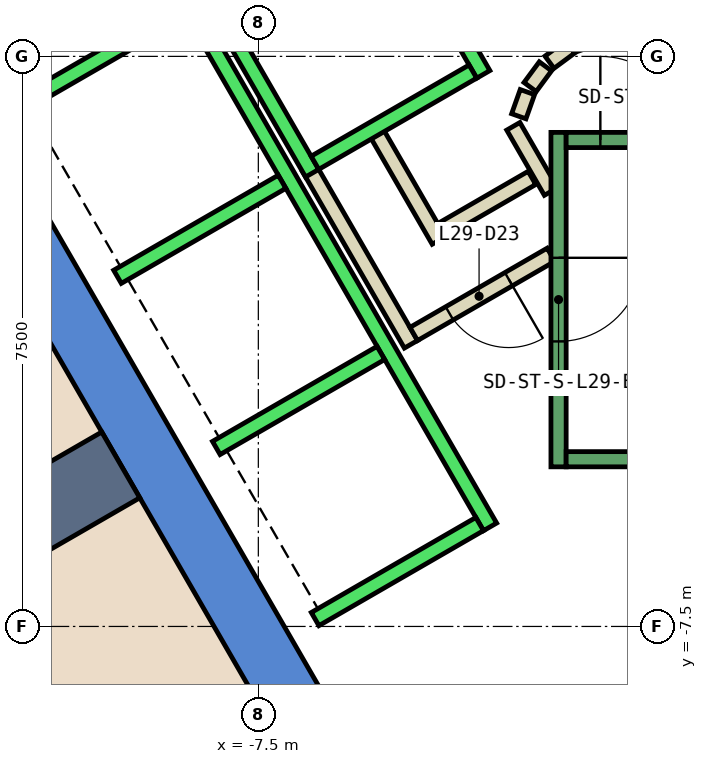
"""IFC4 building model, lengths in metres.
Left out: names, types, materials, properties, quantities, classifications, styles, units other than length and angle.
Written with IfcOpenShell. Run it as: python <this file> out.ifc"""

import sys

from ifc_helpers import new_model, si_unit, direction, frame, frame_2d, origin, place, context, subcontext, project, spatial, polyline, rectangle, outline, extrude, element, fill, save


model = new_model("IFC4")
c1 = context("Model", 3, precision=1e-05, world=origin(), true_north=direction((0.0, 1.0)))
c2 = subcontext(c1, "Body", "Model", "MODEL_VIEW")
j1 = project(units=[si_unit("LENGTHUNIT", "METRE"), si_unit("PLANEANGLEUNIT", "RADIAN")], contexts=[c1])
p1 = place(None, origin())
s1 = spatial("IfcSite", under=j1, at=p1, CompositionType="ELEMENT")
p2 = place(p1, origin())
s2 = spatial("IfcBuilding", under=s1, at=p2, CompositionType="ELEMENT")
p3 = place(p2, frame((0.0, 0.0, 132.8)))
s3 = spatial("IfcBuildingStorey", under=s2, at=p3, CompositionType="ELEMENT", Elevation=132.8)
p4 = place(p3, frame((0.0, 0.0, -0.6)))
e1 = element("IfcWall", 1, at=p4, inside=s3, PredefinedType="SHEAR", context=c2, shape_type="SweptSolid", body=[
    extrude(outline(polyline([(-13.856, 2.5), (-6.928, -9.5), (-6.466, -8.7), (-12.933, 2.5), (-13.856, 2.5)])), origin(), (0.0, 0.0, 1.0), 5.4),
])
p5 = place(p3, frame((-9.31, -5.375, 0.0), z_axis=(0.0, 0.0, 1.0), x_axis=(-0.86602173752, -0.500006350103, 0.0)))
e2 = element("IfcWall", 2, at=p5, inside=s3, PredefinedType="SHEAR", context=c2, shape_type="SweptSolid", body=[
    extrude(rectangle(XDim=31.463, YDim=1.0, at=frame_2d((15.732, 0.0))), origin(), (0.0, 0.0, 1.0), 4.8),
])
p6 = place(p3, frame((-3.9, -1.599, 0.0), z_axis=(0.0, 0.0, 1.0), x_axis=(-0.865969445389, -0.500096910261, 0.0)))
e3 = element("IfcWall", 3, at=p6, inside=s3, PredefinedType="PARTITIONING", context=c2, shape_type="SweptSolid", body=[
    extrude(rectangle(XDim=1.373, YDim=0.2, at=frame_2d((0.687, 0.0))), origin(), (0.0, 0.0, 1.0), 4.8),
])
p7 = place(p3, frame((-5.126, -2.422, 0.0), z_axis=(0.0, 0.0, 1.0), x_axis=(-0.500062241894, 0.865989465428, 0.0)))
e4 = element("IfcWall", 4, at=p7, inside=s3, PredefinedType="PARTITIONING", context=c2, shape_type="SweptSolid", body=[
    extrude(rectangle(XDim=1.7, YDim=0.2, at=frame_2d((0.85, 0.0))), origin(), (0.0, 0.0, 1.0), 4.8),
])
p8 = place(p3, frame((-5.492, -3.788, 0.0), z_axis=(0.0, 0.0, 1.0), x_axis=(-0.500008949224, 0.866020236886, 0.0)))
e5 = element("IfcWall", 5, at=p8, inside=s3, PredefinedType="PARTITIONING", context=c2, shape_type="SweptSolid", body=[
    extrude(rectangle(XDim=2.68, YDim=0.2, at=frame_2d((1.34, 0.0))), origin(), (0.0, 0.0, 1.0), 4.8),
])
p9 = place(p3, frame((-4.145, -0.92, 0.0), z_axis=(0.0, 0.0, 1.0), x_axis=(0.499743786207, -0.866173278362, 0.0)))
e6 = element("IfcWall", 6, at=p9, inside=s3, PredefinedType="PARTITIONING", context=c2, shape_type="SweptSolid", body=[
    extrude(rectangle(XDim=0.991, YDim=0.2, at=frame_2d((0.495, 0.0))), origin(), (0.0, 0.0, 1.0), 4.8),
])
p10 = place(p3, frame((-3.65, -2.61, 0.0), z_axis=(0.0, 0.0, 1.0), x_axis=(-0.866072462134, -0.499918483688, 0.0)))
e7 = element("IfcWall", 7, at=p10, inside=s3, PredefinedType="PARTITIONING", context=c2, shape_type="SweptSolid", body=[
    extrude(rectangle(XDim=2.084, YDim=0.2, at=frame_2d((1.042, 0.0))), origin(), (0.0, 0.0, 1.0), 4.8),
])
p11 = place(p10, frame((0.642, 0.0, 0.0)))
e8 = element("IfcOpeningElement", 8, at=p11, cuts=e7, PredefinedType="OPENING", context=c2, shape_type="SweptSolid", body=[
    extrude(rectangle(XDim=0.9, YDim=2.1, at=frame_2d((0.45, 1.05))), frame((0.0, 0.11, 0.0), z_axis=(0.0, -1.0, 0.0), x_axis=(1.0, 0.0, 0.0)), (0.0, 0.0, 1.0), 0.22),
])
p12 = place(p3, frame((-3.397, 0.124, 0.0), z_axis=(0.0, 0.0, 1.0), x_axis=(-0.804311165252, -0.594208338422, 0.0)))
e9 = element("IfcWall", 9, at=p12, inside=s3, PredefinedType="PARTITIONING", context=c2, shape_type="SweptSolid", body=[
    extrude(rectangle(XDim=0.338, YDim=0.2, at=frame_2d((0.169, 0.0))), origin(), (0.0, 0.0, 1.0), 4.8),
])
p13 = place(p3, frame((-3.723, -0.131, 0.0), z_axis=(0.0, 0.0, 1.0), x_axis=(-0.594675113454, -0.803966112121, 0.0)))
e10 = element("IfcWall", 10, at=p13, inside=s3, PredefinedType="PARTITIONING", context=c2, shape_type="SweptSolid", body=[
    extrude(rectangle(XDim=0.338, YDim=0.2, at=frame_2d((0.169, 0.0))), origin(), (0.0, 0.0, 1.0), 4.8),
])
p14 = place(p3, frame((-3.96, -0.47, 0.0), z_axis=(0.0, 0.0, 1.0), x_axis=(-0.334824194261, -0.942280615813, 0.0)))
e11 = element("IfcWall", 11, at=p14, inside=s3, PredefinedType="PARTITIONING", context=c2, shape_type="SweptSolid", body=[
    extrude(rectangle(XDim=0.338, YDim=0.2, at=frame_2d((0.169, 0.0))), origin(), (0.0, 0.0, 1.0), 4.8),
])
p15 = place(p3, frame((-10.2, -8.632, 0.0), z_axis=(0.0, 0.0, 1.0), x_axis=(-0.500482758314, 0.865746503678, 0.0)))
e12 = element("IfcWall", 12, at=p15, inside=s3, PredefinedType="PARTITIONING", context=c2, shape_type="SweptSolid", body=[
    extrude(rectangle(XDim=0.991, YDim=0.2, at=frame_2d((0.496, 0.0))), origin(), (0.0, 0.0, 1.0), 2.3),
])
p16 = place(p3, frame((-5.94, 2.188, 0.0), z_axis=(0.0, 0.0, 1.0), x_axis=(0.49994636267, -0.866056369097, 0.0)))
e13 = element("IfcWall", 13, at=p16, inside=s3, PredefinedType="STANDARD", context=c2, shape_type="SweptSolid", body=[
    extrude(rectangle(XDim=2.8, YDim=0.2, at=frame_2d((1.4, 0.0))), origin(), (0.0, 0.0, 1.0), 4.8),
])
p17 = place(p16, frame((1.225, 0.0, 0.0)))
e14 = element("IfcOpeningElement", 14, at=p17, cuts=e13, PredefinedType="OPENING", context=c2, shape_type="SweptSolid", body=[
    extrude(rectangle(XDim=1.1, YDim=2.1, at=frame_2d((0.55, 1.05))), frame((0.0, 0.11, 0.0), z_axis=(0.0, -1.0, 0.0), x_axis=(1.0, 0.0, 0.0)), (0.0, 0.0, 1.0), 0.22),
])
p18 = place(p3, frame((-8.192, 0.888, 0.0), z_axis=(0.0, 0.0, 1.0), x_axis=(0.49994636267, -0.866056369097, 0.0)))
e15 = element("IfcWall", 15, at=p18, inside=s3, PredefinedType="STANDARD", context=c2, shape_type="SweptSolid", body=[
    extrude(rectangle(XDim=2.8, YDim=0.2, at=frame_2d((1.4, 0.0))), origin(), (0.0, 0.0, 1.0), 4.8),
])
p19 = place(p3, frame((-4.677, -0.2, 0.0), z_axis=(0.0, 0.0, 1.0), x_axis=(-0.865973769406, -0.500089422704, 0.0)))
e16 = element("IfcWall", 16, at=p19, inside=s3, PredefinedType="STANDARD", context=c2, shape_type="SweptSolid", body=[
    extrude(rectangle(XDim=2.399, YDim=0.2, at=frame_2d((1.2, 0.0))), origin(), (0.0, 0.0, 1.0), 4.8),
])
p20 = place(p3, frame((-9.751, 2.99, 0.0), z_axis=(0.0, 0.0, 1.0), x_axis=(0.50000090737, -0.866024879913, 0.0)))
e17 = element("IfcWall", 17, at=p20, inside=s3, PredefinedType="STANDARD", context=c2, shape_type="SweptSolid", body=[
    extrude(rectangle(XDim=10.6, YDim=0.2, at=frame_2d((5.3, 0.0))), origin(), (0.0, 0.0, 1.0), 4.8),
])
for number, where, z_axis, x_axis in (
    (18, (-8.488, 0.602, 0.0), (0.0, 0.0, 1.0), (-0.866, -0.5, 0.0)),
    (19, (-7.188, -1.65, 0.0), (0.0, 0.0, 1.0), (-0.866, -0.5, 0.0)),
    (20, (-5.888, -3.902, 0.0), (0.0, 0.0, 1.0), (-0.866, -0.5, 0.0)),
    (21, (-4.588, -6.153, 0.0), (0.0, 0.0, 1.0), (-0.866, -0.5, 0.0)),
):
    element("IfcWall", number, at=place(p3, frame(where, z_axis=z_axis, x_axis=x_axis)), inside=s3, PredefinedType="STANDARD", context=c2, shape_type="SweptSolid", body=[
        extrude(rectangle(XDim=2.5, YDim=0.2, at=frame_2d((1.25, 0.0))), origin(), (0.0, 0.0, 1.0), 4.8),
    ])
p21 = place(p3, frame((-3.55, -1.0, 0.0), z_axis=(0.0, 0.0, 1.0), x_axis=(0.0, -1.0, 0.0)))
e22 = element("IfcWall", 22, at=p21, inside=s3, PredefinedType="STANDARD", context=c2, shape_type="SweptSolid", body=[
    extrude(rectangle(XDim=4.4, YDim=0.2, at=frame_2d((2.2, 0.0))), origin(), (0.0, 0.0, 1.0), 4.8),
])
p22 = place(p21, frame((1.65, 0.0, 0.0)))
e23 = element("IfcOpeningElement", 23, at=p22, cuts=e22, PredefinedType="OPENING", context=c2, shape_type="SweptSolid", body=[
    extrude(rectangle(XDim=1.1, YDim=2.2, at=frame_2d((0.55, 1.1))), frame((0.0, 0.11, 0.0), z_axis=(0.0, -1.0, 0.0), x_axis=(1.0, 0.0, 0.0)), (0.0, 0.0, 1.0), 0.22),
])
p23 = place(p3, frame((-3.45, -1.1, 0.0), z_axis=(0.0, 0.0, 1.0), x_axis=(1.0, 0.0, 0.0)))
e24 = element("IfcWall", 24, at=p23, inside=s3, PredefinedType="STANDARD", context=c2, shape_type="SweptSolid", body=[
    extrude(rectangle(XDim=6.9, YDim=0.2, at=frame_2d((3.45, 0.0))), origin(), (0.0, 0.0, 1.0), 4.8),
])
p24 = place(p23, frame((0.45, 0.0, 0.0)))
e25 = element("IfcOpeningElement", 25, at=p24, cuts=e24, PredefinedType="OPENING", context=c2, shape_type="SweptSolid", body=[
    extrude(rectangle(XDim=1.1, YDim=2.2, at=frame_2d((0.55, 1.1))), frame((0.0, 0.11, 0.0), z_axis=(0.0, -1.0, 0.0), x_axis=(1.0, 0.0, 0.0)), (0.0, 0.0, 1.0), 0.22),
])
p25 = place(p3, frame((-3.45, -5.3, 0.0), z_axis=(0.0, 0.0, 1.0), x_axis=(1.0, 0.0, 0.0)))
e26 = element("IfcWall", 26, at=p25, inside=s3, PredefinedType="STANDARD", context=c2, shape_type="SweptSolid", body=[
    extrude(rectangle(XDim=6.9, YDim=0.2, at=frame_2d((3.45, 0.0))), origin(), (0.0, 0.0, 1.0), 4.8),
])
p26 = place(p11, origin())
e27 = element("IfcDoor", 27, at=p26, inside=s3, OperationType="SINGLE_SWING_LEFT", PredefinedType="DOOR", context=c2, shape_type="SweptSolid", body=[
    extrude(rectangle(XDim=0.9, YDim=2.1, at=frame_2d((0.45, 1.05))), frame((0.0, 0.025, 0.0), z_axis=(0.0, -1.0, 0.0), x_axis=(1.0, 0.0, 0.0)), (0.0, 0.0, 1.0), 0.05),
])
fill(e8, e27)
p27 = place(p24, origin())
e28 = element("IfcDoor", 28, at=p27, inside=s3, OperationType="SINGLE_SWING_LEFT", PredefinedType="DOOR", context=c2, shape_type="SweptSolid", body=[
    extrude(rectangle(XDim=1.1, YDim=2.2, at=frame_2d((0.55, 1.1))), frame((0.0, 0.025, 0.0), z_axis=(0.0, -1.0, 0.0), x_axis=(1.0, 0.0, 0.0)), (0.0, 0.0, 1.0), 0.05),
])
fill(e25, e28)
p28 = place(p22, origin())
e29 = element("IfcDoor", 29, at=p28, inside=s3, OperationType="SINGLE_SWING_LEFT", PredefinedType="DOOR", context=c2, shape_type="SweptSolid", body=[
    extrude(rectangle(XDim=1.1, YDim=2.2, at=frame_2d((0.55, 1.1))), frame((0.0, 0.025, 0.0), z_axis=(0.0, -1.0, 0.0), x_axis=(1.0, 0.0, 0.0)), (0.0, 0.0, 1.0), 0.05),
])
fill(e23, e29)
save(model, sys.argv[1])
